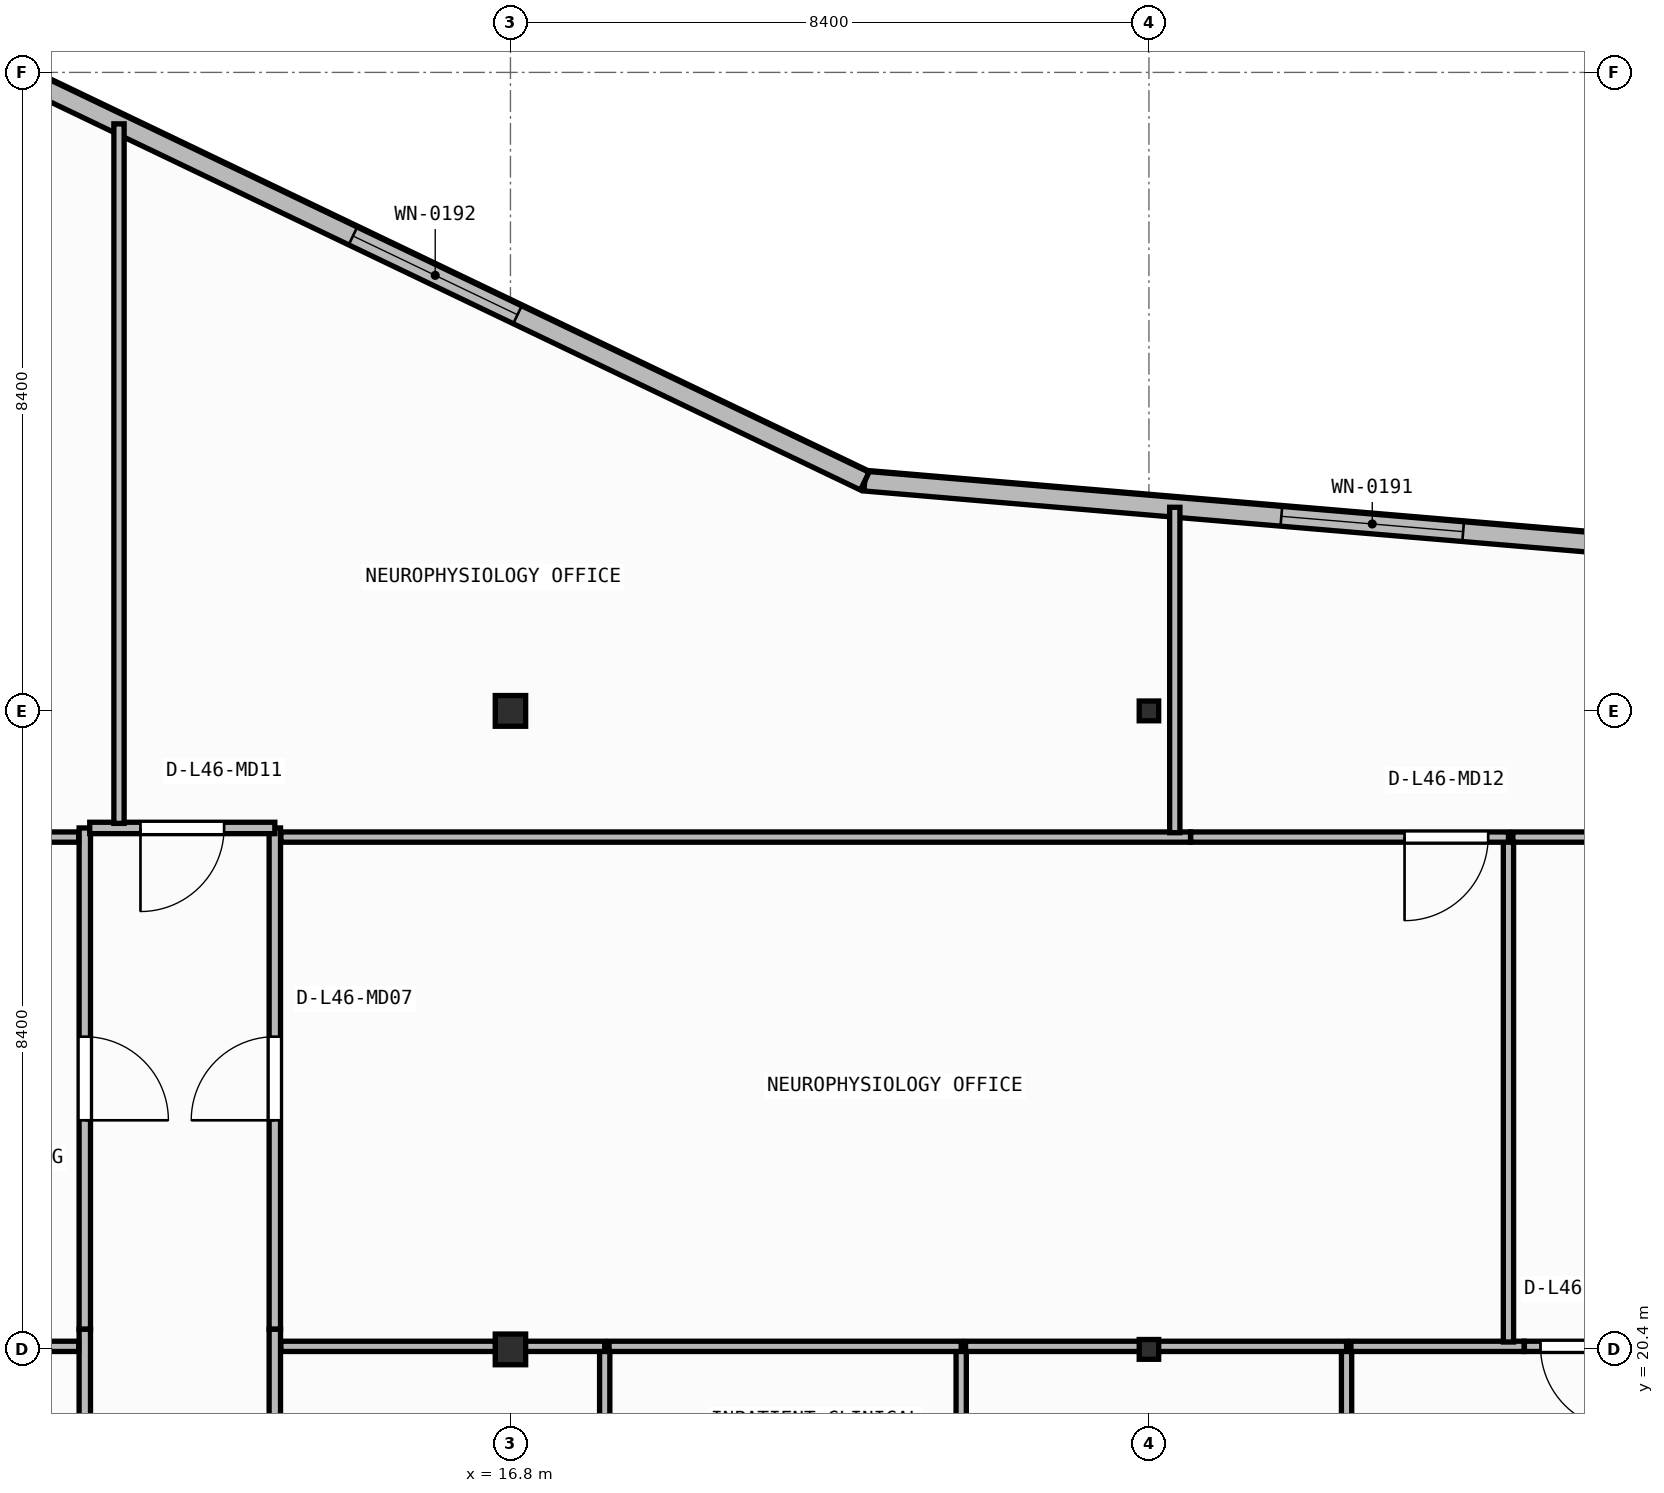
"""IFC4 building model, lengths in metres.
Left out: names, types, materials, properties, quantities, classifications, styles, units other than length and angle.
Written with IfcOpenShell. Run it as: python <this file> out.ifc"""

import sys

from ifc_helpers import new_model, si_unit, direction, frame, frame_2d, origin, origin_2d, place, context, subcontext, project, spatial, rectangle, i_section, extrude, element, fill, save


model = new_model("IFC4")
c1 = context("Model", 3, precision=1e-05, world=origin(), true_north=direction((0.0, 1.0)))
c2 = subcontext(c1, "Body", "Model", "MODEL_VIEW")
j1 = project(units=[si_unit("LENGTHUNIT", "METRE"), si_unit("PLANEANGLEUNIT", "RADIAN")], contexts=[c1])
p1 = place(None, origin())
s1 = spatial("IfcSite", under=j1, at=p1, CompositionType="ELEMENT")
p2 = place(p1, origin())
s2 = spatial("IfcBuilding", under=s1, at=p2, CompositionType="ELEMENT")
p3 = place(p2, frame((0.0, 0.0, 188.15)))
s3 = spatial("IfcBuildingStorey", under=s2, at=p3, CompositionType="ELEMENT", Elevation=188.15)
p4 = place(p3, frame((16.8, 20.4, 0.0), z_axis=(0.0, 0.0, 1.0), x_axis=(1.0, 0.0, 0.0)))
e1 = element("IfcColumn", 1, at=p4, inside=s3, PredefinedType="COLUMN", context=c2, shape_type="SweptSolid", body=[
    extrude(i_section(OverallWidth=0.4, OverallDepth=0.404, WebThickness=0.02, FlangeThickness=0.032, at=origin_2d()), origin(), (0.0, 0.0, 1.0), 3.95),
])
p5 = place(p3, frame((25.2, 20.4, 0.0), z_axis=(0.0, 0.0, 1.0), x_axis=(1.0, 0.0, 0.0)))
e2 = element("IfcColumn", 2, at=p5, inside=s3, PredefinedType="COLUMN", context=c2, shape_type="SweptSolid", body=[
    extrude(i_section(OverallWidth=0.256, OverallDepth=0.26, WebThickness=0.01, FlangeThickness=0.017, FilletRadius=0.013, at=origin_2d()), origin(), (0.0, 0.0, 1.0), 3.95),
])
p6 = place(p3, frame((16.8, 28.8, 0.0), z_axis=(0.0, 0.0, 1.0), x_axis=(1.0, 0.0, 0.0)))
e3 = element("IfcColumn", 3, at=p6, inside=s3, PredefinedType="COLUMN", context=c2, shape_type="SweptSolid", body=[
    extrude(i_section(OverallWidth=0.4, OverallDepth=0.404, WebThickness=0.02, FlangeThickness=0.032, at=origin_2d()), origin(), (0.0, 0.0, 1.0), 3.95),
])
p7 = place(p3, frame((25.2, 28.8, 0.0), z_axis=(0.0, 0.0, 1.0), x_axis=(1.0, 0.0, 0.0)))
e4 = element("IfcColumn", 4, at=p7, inside=s3, PredefinedType="COLUMN", context=c2, shape_type="SweptSolid", body=[
    extrude(i_section(OverallWidth=0.256, OverallDepth=0.26, WebThickness=0.01, FlangeThickness=0.017, FilletRadius=0.013, at=origin_2d()), origin(), (0.0, 0.0, 1.0), 3.95),
])
p8 = place(p3, frame((34.815, 30.696, 0.0), z_axis=(0.0, 0.0, 1.0), x_axis=(-0.996454704935, 0.084130975344, 0.0)))
e5 = element("IfcWall", 5, at=p8, inside=s3, PredefinedType="STANDARD", context=c2, shape_type="SweptSolid", body=[
    extrude(rectangle(XDim=13.401, YDim=0.26, at=frame_2d((6.701, 0.0))), origin(), (0.0, 0.0, 1.0), 3.71),
])
p9 = place(p8, frame((5.5, 0.0, 0.9)))
e6 = element("IfcOpeningElement", 6, at=p9, cuts=e5, PredefinedType="OPENING", context=c2, shape_type="SweptSolid", body=[
    extrude(rectangle(XDim=2.4, YDim=1.65, at=frame_2d((1.2, 0.825))), frame((0.0, 0.14, 0.0), z_axis=(0.0, -1.0, 0.0), x_axis=(1.0, 0.0, 0.0)), (0.0, 0.0, 1.0), 0.28),
])
p10 = place(p3, frame((21.461, 31.823, 0.0), z_axis=(0.0, 0.0, 1.0), x_axis=(-0.901858094827, 0.432032379336, 0.0)))
e7 = element("IfcWall", 7, at=p10, inside=s3, PredefinedType="STANDARD", context=c2, shape_type="SweptSolid", body=[
    extrude(rectangle(XDim=12.532, YDim=0.26, at=frame_2d((6.266, 0.0))), origin(), (0.0, 0.0, 1.0), 3.71),
])
p11 = place(p10, frame((5.066, 0.0, 0.9)))
e8 = element("IfcOpeningElement", 8, at=p11, cuts=e7, PredefinedType="OPENING", context=c2, shape_type="SweptSolid", body=[
    extrude(rectangle(XDim=2.4, YDim=1.65, at=frame_2d((1.2, 0.825))), frame((0.0, 0.14, 0.0), z_axis=(0.0, -1.0, 0.0), x_axis=(1.0, 0.0, 0.0)), (0.0, 0.0, 1.0), 0.28),
])
for number, where, z_axis, x_axis in (
    (9, (11.2, 20.666, 0.0), (0.0, 0.0, 1.0), (0.0, -1.0, 0.0)),
    (10, (13.7, 14.7, 0.0), (0.0, 0.0, 1.0), (0.0, 1.0, 0.0)),
):
    element("IfcWall", number, at=place(p3, frame(where, z_axis=z_axis, x_axis=x_axis)), inside=s3, PredefinedType="PARTITIONING", context=c2, shape_type="SweptSolid", body=[
        extrude(rectangle(XDim=5.966, YDim=0.15, at=frame_2d((2.983, 0.0))), origin(), (0.0, 0.0, 1.0), 3.71),
    ])
p12 = place(p3, frame((11.2, 27.26, 0.0), z_axis=(0.0, 0.0, 1.0), x_axis=(0.0, -1.0, 0.0)))
e11 = element("IfcWall", 11, at=p12, inside=s3, PredefinedType="PARTITIONING", context=c2, shape_type="SweptSolid", body=[
    extrude(rectangle(XDim=6.592, YDim=0.15, at=frame_2d((3.296, 0.0))), origin(), (0.0, 0.0, 1.0), 3.71),
])
p13 = place(p12, frame((2.746, 0.0, 0.0)))
e12 = element("IfcOpeningElement", 12, at=p13, cuts=e11, PredefinedType="OPENING", context=c2, shape_type="SweptSolid", body=[
    extrude(rectangle(XDim=1.1, YDim=2.1, at=frame_2d((0.55, 1.05))), frame((0.0, 0.085, 0.0), z_axis=(0.0, -1.0, 0.0), x_axis=(1.0, 0.0, 0.0)), (0.0, 0.0, 1.0), 0.17),
])
p14 = place(p3, frame((13.7, 20.668, 0.0), z_axis=(0.0, 0.0, 1.0), x_axis=(0.0, 1.0, 0.0)))
e13 = element("IfcWall", 13, at=p14, inside=s3, PredefinedType="PARTITIONING", context=c2, shape_type="SweptSolid", body=[
    extrude(rectangle(XDim=6.592, YDim=0.15, at=frame_2d((3.296, 0.0))), origin(), (0.0, 0.0, 1.0), 3.71),
])
p15 = place(p14, frame((2.746, 0.0, 0.0)))
e14 = element("IfcOpeningElement", 14, at=p15, cuts=e13, PredefinedType="OPENING", context=c2, shape_type="SweptSolid", body=[
    extrude(rectangle(XDim=1.1, YDim=2.1, at=frame_2d((0.55, 1.05))), frame((0.0, 0.085, 0.0), z_axis=(0.0, -1.0, 0.0), x_axis=(1.0, 0.0, 0.0)), (0.0, 0.0, 1.0), 0.17),
])
p16 = place(p3, frame((13.7, 27.26, 0.0), z_axis=(0.0, 0.0, 1.0), x_axis=(-1.0, 0.0, 0.0)))
e15 = element("IfcWall", 15, at=p16, inside=s3, PredefinedType="PARTITIONING", context=c2, shape_type="SweptSolid", body=[
    extrude(rectangle(XDim=2.435, YDim=0.15, at=frame_2d((1.218, 0.0))), origin(), (0.0, 0.0, 1.0), 3.71),
])
p17 = place(p16, frame((0.667, 0.0, 0.0)))
e16 = element("IfcOpeningElement", 16, at=p17, cuts=e15, PredefinedType="OPENING", context=c2, shape_type="SweptSolid", body=[
    extrude(rectangle(XDim=1.1, YDim=2.1, at=frame_2d((0.55, 1.05))), frame((0.0, 0.085, 0.0), z_axis=(0.0, -1.0, 0.0), x_axis=(1.0, 0.0, 0.0)), (0.0, 0.0, 1.0), 0.17),
])
p18 = place(p3, frame((11.12, 20.44, 0.0), z_axis=(0.0, 0.0, 1.0), x_axis=(-1.0, 0.0, 0.0)))
e17 = element("IfcWall", 17, at=p18, inside=s3, PredefinedType="PARTITIONING", context=c2, shape_type="SweptSolid", body=[
    extrude(rectangle(XDim=5.653, YDim=0.135, at=frame_2d((2.826, 0.0))), origin(), (0.0, 0.0, 1.0), 3.152),
])
p19 = place(p3, frame((18.04, 17.833, 0.0), z_axis=(0.0, 0.0, 1.0), x_axis=(0.0, 1.0, 0.0)))
e18 = element("IfcWall", 18, at=p19, inside=s3, PredefinedType="PARTITIONING", context=c2, shape_type="SweptSolid", body=[
    extrude(rectangle(XDim=2.607, YDim=0.135, at=frame_2d((1.304, 0.0))), origin(), (0.0, 0.0, 1.0), 3.71),
])
p20 = place(p3, frame((18.04, 20.44, 0.0), z_axis=(0.0, 0.0, 1.0), x_axis=(-1.0, 0.0, 0.0)))
e19 = element("IfcWall", 19, at=p20, inside=s3, PredefinedType="PARTITIONING", context=c2, shape_type="SweptSolid", body=[
    extrude(rectangle(XDim=4.26, YDim=0.135, at=frame_2d((2.13, 0.0))), origin(), (0.0, 0.0, 1.0), 3.152),
])
p21 = place(p3, frame((22.73, 14.76, 0.0), z_axis=(0.0, 0.0, 1.0), x_axis=(0.0, 1.0, 0.0)))
e20 = element("IfcWall", 20, at=p21, inside=s3, PredefinedType="PARTITIONING", context=c2, shape_type="SweptSolid", body=[
    extrude(rectangle(XDim=5.68, YDim=0.135, at=frame_2d((2.84, 0.0))), origin(), (0.0, 0.0, 1.0), 3.71),
])
p22 = place(p3, frame((22.73, 20.44, 0.0), z_axis=(0.0, 0.0, 1.0), x_axis=(-1.0, 0.0, 0.0)))
e21 = element("IfcWall", 21, at=p22, inside=s3, PredefinedType="PARTITIONING", context=c2, shape_type="SweptSolid", body=[
    extrude(rectangle(XDim=4.633, YDim=0.135, at=frame_2d((2.316, 0.0))), origin(), (0.0, 0.0, 1.0), 3.152),
])
p23 = place(p3, frame((27.8, 17.833, 0.0), z_axis=(0.0, 0.0, 1.0), x_axis=(0.0, 1.0, 0.0)))
e22 = element("IfcWall", 22, at=p23, inside=s3, PredefinedType="PARTITIONING", context=c2, shape_type="SweptSolid", body=[
    extrude(rectangle(XDim=2.607, YDim=0.135, at=frame_2d((1.304, 0.0))), origin(), (0.0, 0.0, 1.0), 3.71),
])
p24 = place(p3, frame((27.8, 20.44, 0.0), z_axis=(0.0, 0.0, 1.0), x_axis=(-1.0, 0.0, 0.0)))
e23 = element("IfcWall", 23, at=p24, inside=s3, PredefinedType="PARTITIONING", context=c2, shape_type="SweptSolid", body=[
    extrude(rectangle(XDim=5.012, YDim=0.135, at=frame_2d((2.506, 0.0))), origin(), (0.0, 0.0, 1.0), 3.152),
])
p25 = place(p3, frame((30.137, 20.44, 0.0), z_axis=(0.0, 0.0, 1.0), x_axis=(-1.0, 0.0, 0.0)))
e24 = element("IfcWall", 24, at=p25, inside=s3, PredefinedType="PARTITIONING", context=c2, shape_type="SweptSolid", body=[
    extrude(rectangle(XDim=2.28, YDim=0.135, at=frame_2d((1.14, 0.0))), origin(), (0.0, 0.0, 1.0), 3.152),
])
p26 = place(p3, frame((32.12, 20.44, 0.0), z_axis=(0.0, 0.0, 1.0), x_axis=(-1.0, 0.0, 0.0)))
e25 = element("IfcWall", 25, at=p26, inside=s3, PredefinedType="PARTITIONING", context=c2, shape_type="SweptSolid", body=[
    extrude(rectangle(XDim=1.981, YDim=0.135, at=frame_2d((0.99, 0.0))), origin(), (0.0, 0.0, 1.0), 3.152),
])
p27 = place(p26, frame((0.668, 0.0, 0.0)))
e26 = element("IfcOpeningElement", 26, at=p27, cuts=e25, PredefinedType="OPENING", context=c2, shape_type="SweptSolid", body=[
    extrude(rectangle(XDim=1.1, YDim=2.1, at=frame_2d((0.55, 1.05))), frame((0.0, 0.077, 0.0), z_axis=(0.0, -1.0, 0.0), x_axis=(1.0, 0.0, 0.0)), (0.0, 0.0, 1.0), 0.155),
])
p28 = place(p3, frame((11.12, 27.14, 0.0), z_axis=(0.0, 0.0, 1.0), x_axis=(-1.0, 0.0, 0.0)))
e27 = element("IfcWall", 27, at=p28, inside=s3, PredefinedType="PARTITIONING", context=c2, shape_type="SweptSolid", body=[
    extrude(rectangle(XDim=10.88, YDim=0.135, at=frame_2d((5.44, 0.0))), origin(), (0.0, 0.0, 1.0), 3.71),
])
p29 = place(p28, frame((5.828, 0.0, 0.0)))
e28 = element("IfcOpeningElement", 28, at=p29, cuts=e27, PredefinedType="OPENING", context=c2, shape_type="SweptSolid", body=[
    extrude(rectangle(XDim=1.1, YDim=2.1, at=frame_2d((0.55, 1.05))), frame((0.0, 0.077, 0.0), z_axis=(0.0, -1.0, 0.0), x_axis=(1.0, 0.0, 0.0)), (0.0, 0.0, 1.0), 0.155),
])
p30 = place(p3, frame((29.93, 20.498, 0.0), z_axis=(0.0, 0.0, 1.0), x_axis=(0.0, 1.0, 0.0)))
e29 = element("IfcWall", 29, at=p30, inside=s3, PredefinedType="PARTITIONING", context=c2, shape_type="SweptSolid", body=[
    extrude(rectangle(XDim=6.642, YDim=0.135, at=frame_2d((3.321, 0.0))), origin(), (0.0, 0.0, 1.0), 3.71),
])
p31 = place(p3, frame((25.748, 27.14, 0.0), z_axis=(0.0, 0.0, 1.0), x_axis=(-1.0, 0.0, 0.0)))
e30 = element("IfcWall", 30, at=p31, inside=s3, PredefinedType="PARTITIONING", context=c2, shape_type="SweptSolid", body=[
    extrude(rectangle(XDim=11.968, YDim=0.135, at=frame_2d((5.984, 0.0))), origin(), (0.0, 0.0, 1.0), 3.71),
])
p32 = place(p3, frame((29.93, 27.14, 0.0), z_axis=(0.0, 0.0, 1.0), x_axis=(-1.0, 0.0, 0.0)))
e31 = element("IfcWall", 31, at=p32, inside=s3, PredefinedType="PARTITIONING", context=c2, shape_type="SweptSolid", body=[
    extrude(rectangle(XDim=4.18, YDim=0.135, at=frame_2d((2.09, 0.0))), origin(), (0.0, 0.0, 1.0), 3.71),
])
p33 = place(p32, frame((0.267, 0.0, 0.0)))
e32 = element("IfcOpeningElement", 32, at=p33, cuts=e31, PredefinedType="OPENING", context=c2, shape_type="SweptSolid", body=[
    extrude(rectangle(XDim=1.1, YDim=2.1, at=frame_2d((0.55, 1.05))), frame((0.0, 0.077, 0.0), z_axis=(0.0, -1.0, 0.0), x_axis=(1.0, 0.0, 0.0)), (0.0, 0.0, 1.0), 0.155),
])
p34 = place(p3, frame((39.07, 27.14, 0.0), z_axis=(0.0, 0.0, 1.0), x_axis=(-1.0, 0.0, 0.0)))
e33 = element("IfcWall", 33, at=p34, inside=s3, PredefinedType="PARTITIONING", context=c2, shape_type="SweptSolid", body=[
    extrude(rectangle(XDim=9.083, YDim=0.135, at=frame_2d((4.541, 0.0))), origin(), (0.0, 0.0, 1.0), 3.71),
])
p35 = place(p3, frame((11.65, 27.32, 0.0), z_axis=(0.0, 0.0, 1.0), x_axis=(0.0, 1.0, 0.0)))
e34 = element("IfcWall", 34, at=p35, inside=s3, PredefinedType="PARTITIONING", context=c2, shape_type="SweptSolid", body=[
    extrude(rectangle(XDim=9.203, YDim=0.135, at=frame_2d((4.602, 0.0))), origin(), (0.0, 0.0, 1.0), 3.71),
])
p36 = place(p3, frame((25.54, 27.198, 0.0), z_axis=(0.0, 0.0, 1.0), x_axis=(0.0, 1.0, 0.0)))
e35 = element("IfcWall", 35, at=p36, inside=s3, PredefinedType="PARTITIONING", context=c2, shape_type="SweptSolid", body=[
    extrude(rectangle(XDim=4.281, YDim=0.135, at=frame_2d((2.141, 0.0))), origin(), (0.0, 0.0, 1.0), 3.152),
])
p37 = place(p9, origin())
e36 = element("IfcWindow", 36, at=p37, inside=s3, PartitioningType="SINGLE_PANEL", PredefinedType="WINDOW", context=c2, shape_type="SweptSolid", body=[
    extrude(rectangle(XDim=2.4, YDim=1.65, at=frame_2d((1.2, 0.825))), frame((0.0, 0.03, 0.0), z_axis=(0.0, -1.0, 0.0), x_axis=(1.0, 0.0, 0.0)), (0.0, 0.0, 1.0), 0.06),
])
fill(e6, e36)
p38 = place(p11, origin())
e37 = element("IfcWindow", 37, at=p38, inside=s3, PartitioningType="SINGLE_PANEL", PredefinedType="WINDOW", context=c2, shape_type="SweptSolid", body=[
    extrude(rectangle(XDim=2.4, YDim=1.65, at=frame_2d((1.2, 0.825))), frame((0.0, 0.03, 0.0), z_axis=(0.0, -1.0, 0.0), x_axis=(1.0, 0.0, 0.0)), (0.0, 0.0, 1.0), 0.06),
])
fill(e8, e37)
p39 = place(p13, origin())
e38 = element("IfcDoor", 38, at=p39, inside=s3, OperationType="SINGLE_SWING_RIGHT", PredefinedType="DOOR", context=c2, shape_type="SweptSolid", body=[
    extrude(rectangle(XDim=1.1, YDim=2.1, at=frame_2d((0.55, 1.05))), frame((0.0, 0.025, 0.0), z_axis=(0.0, -1.0, 0.0), x_axis=(1.0, 0.0, 0.0)), (0.0, 0.0, 1.0), 0.05),
])
fill(e12, e38)
p40 = place(p15, origin())
e39 = element("IfcDoor", 39, at=p40, inside=s3, OperationType="SINGLE_SWING_LEFT", PredefinedType="DOOR", context=c2, shape_type="SweptSolid", body=[
    extrude(rectangle(XDim=1.1, YDim=2.1, at=frame_2d((0.55, 1.05))), frame((0.0, 0.025, 0.0), z_axis=(0.0, -1.0, 0.0), x_axis=(1.0, 0.0, 0.0)), (0.0, 0.0, 1.0), 0.05),
])
fill(e14, e39)
p41 = place(p17, origin())
e40 = element("IfcDoor", 40, at=p41, inside=s3, OperationType="SINGLE_SWING_RIGHT", PredefinedType="DOOR", context=c2, shape_type="SweptSolid", body=[
    extrude(rectangle(XDim=1.1, YDim=2.1, at=frame_2d((0.55, 1.05))), frame((0.0, 0.025, 0.0), z_axis=(0.0, -1.0, 0.0), x_axis=(1.0, 0.0, 0.0)), (0.0, 0.0, 1.0), 0.05),
])
fill(e16, e40)
p42 = place(p27, origin())
e41 = element("IfcDoor", 41, at=p42, inside=s3, OperationType="SINGLE_SWING_LEFT", PredefinedType="DOOR", context=c2, shape_type="SweptSolid", body=[
    extrude(rectangle(XDim=1.1, YDim=2.1, at=frame_2d((0.55, 1.05))), frame((0.0, 0.025, 0.0), z_axis=(0.0, -1.0, 0.0), x_axis=(1.0, 0.0, 0.0)), (0.0, 0.0, 1.0), 0.05),
])
fill(e26, e41)
p43 = place(p33, origin())
e42 = element("IfcDoor", 42, at=p43, inside=s3, OperationType="SINGLE_SWING_RIGHT", PredefinedType="DOOR", context=c2, shape_type="SweptSolid", body=[
    extrude(rectangle(XDim=1.1, YDim=2.1, at=frame_2d((0.55, 1.05))), frame((0.0, 0.025, 0.0), z_axis=(0.0, -1.0, 0.0), x_axis=(1.0, 0.0, 0.0)), (0.0, 0.0, 1.0), 0.05),
])
fill(e32, e42)
save(model, sys.argv[1])
